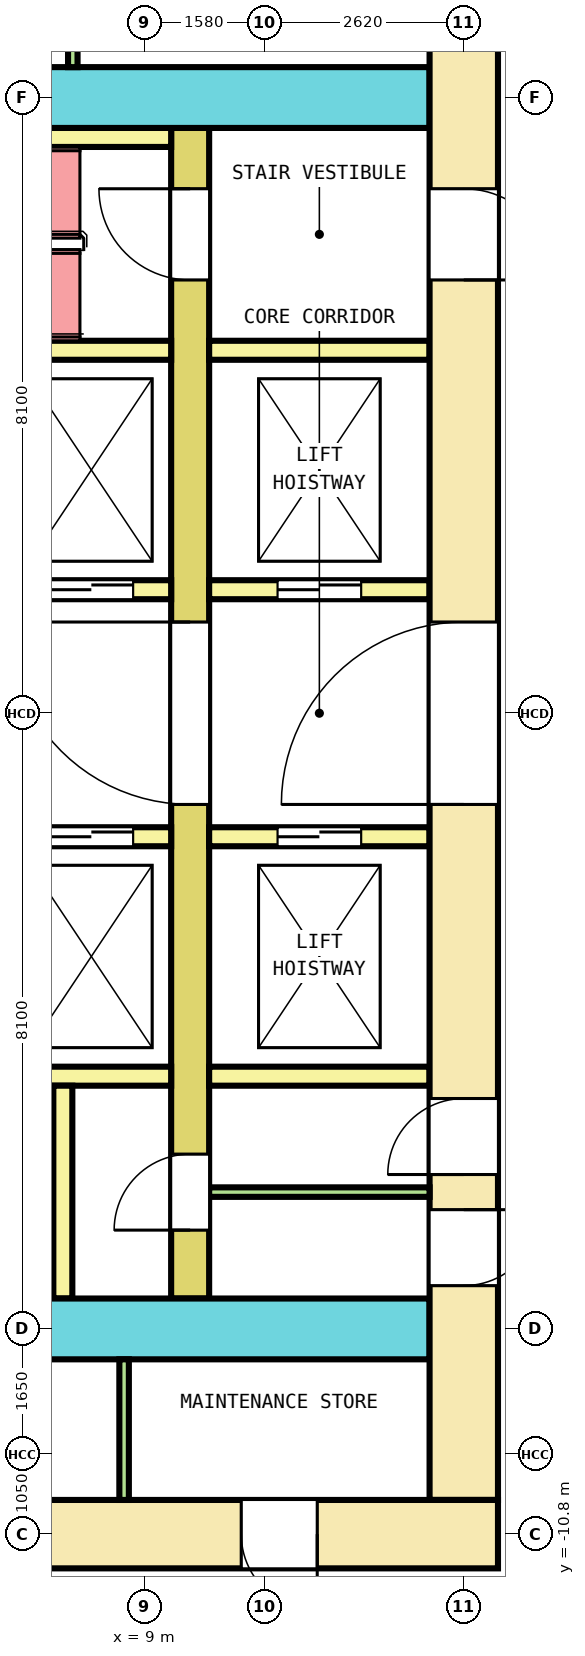
"""IFC4 building model, lengths in metres.
Left out: names, types, materials, properties, quantities, classifications, styles, units other than length and angle.
Written with IfcOpenShell. Run it as: python <this file> out.ifc"""

import sys

from ifc_helpers import new_model, si_unit, direction, frame, frame_2d, origin, place, context, subcontext, project, spatial, rectangle, extrude, element, fill, save


model = new_model("IFC4")
c1 = context("Model", 3, precision=1e-05, world=origin(), true_north=direction((0.0, 1.0)))
c2 = subcontext(c1, "Body", "Model", "MODEL_VIEW")
j1 = project(units=[si_unit("LENGTHUNIT", "METRE"), si_unit("PLANEANGLEUNIT", "RADIAN")], contexts=[c1])
p1 = place(None, origin())
s1 = spatial("IfcSite", under=j1, at=p1, CompositionType="ELEMENT")
p2 = place(p1, origin())
s2 = spatial("IfcBuilding", under=s1, at=p2, CompositionType="ELEMENT")
p3 = place(p2, frame((0.0, 0.0, 27.8)))
s3 = spatial("IfcBuildingStorey", under=s2, at=p3, CompositionType="ELEMENT", Elevation=27.8)
p4 = place(p3, frame((-13.65, -10.8, 0.0), z_axis=(0.0, 0.0, 1.0), x_axis=(1.0, 0.0, 0.0)))
e1 = element("IfcWall", 1, at=p4, inside=s3, PredefinedType="SHEAR", context=c2, shape_type="SweptSolid", body=[
    extrude(rectangle(XDim=27.3, YDim=0.9, at=frame_2d((13.65, 0.0))), origin(), (0.0, 0.0, 1.0), 4.1),
])
p5 = place(p4, frame((3.453, 0.0, 0.0)))
e2 = element("IfcOpeningElement", 2, at=p5, cuts=e1, PredefinedType="OPENING", context=c2, shape_type="SweptSolid", body=[
    extrude(rectangle(XDim=1.0, YDim=2.1, at=frame_2d((0.5, 1.05))), frame((0.0, 0.46, 0.0), z_axis=(0.0, -1.0, 0.0), x_axis=(1.0, 0.0, 0.0)), (0.0, 0.0, 1.0), 0.92),
])
p6 = place(p4, frame((9.653, 0.0, 0.0)))
e3 = element("IfcOpeningElement", 3, at=p6, cuts=e1, PredefinedType="OPENING", context=c2, shape_type="SweptSolid", body=[
    extrude(rectangle(XDim=1.0, YDim=2.1, at=frame_2d((0.5, 1.05))), frame((0.0, 0.46, 0.0), z_axis=(0.0, -1.0, 0.0), x_axis=(1.0, 0.0, 0.0)), (0.0, 0.0, 1.0), 0.92),
])
p7 = place(p4, frame((19.872, 0.0, 0.0)))
e4 = element("IfcOpeningElement", 4, at=p7, cuts=e1, PredefinedType="OPENING", context=c2, shape_type="SweptSolid", body=[
    extrude(rectangle(XDim=1.0, YDim=2.1, at=frame_2d((0.5, 1.05))), frame((0.0, 0.46, 0.0), z_axis=(0.0, -1.0, 0.0), x_axis=(1.0, 0.0, 0.0)), (0.0, 0.0, 1.0), 0.92),
])
p8 = place(p4, frame((23.922, 0.0, 0.0)))
e5 = element("IfcOpeningElement", 5, at=p8, cuts=e1, PredefinedType="OPENING", context=c2, shape_type="SweptSolid", body=[
    extrude(rectangle(XDim=1.0, YDim=2.1, at=frame_2d((0.5, 1.05))), frame((0.0, 0.46, 0.0), z_axis=(0.0, -1.0, 0.0), x_axis=(1.0, 0.0, 0.0)), (0.0, 0.0, 1.0), 0.92),
])
p9 = place(p4, frame((15.2, 0.0, 0.0)))
e6 = element("IfcOpeningElement", 6, at=p9, cuts=e1, PredefinedType="OPENING", context=c2, shape_type="SweptSolid", body=[
    extrude(rectangle(XDim=1.2, YDim=2.1, at=frame_2d((0.6, 1.05))), frame((0.0, 0.46, 0.0), z_axis=(0.0, -1.0, 0.0), x_axis=(1.0, 0.0, 0.0)), (0.0, 0.0, 1.0), 0.92),
])
p10 = place(p3, frame((13.2, -10.35, 0.0), z_axis=(0.0, 0.0, 1.0), x_axis=(0.0, 1.0, 0.0)))
e7 = element("IfcWall", 7, at=p10, inside=s3, PredefinedType="SHEAR", context=c2, shape_type="SweptSolid", body=[
    extrude(rectangle(XDim=20.7, YDim=0.9, at=frame_2d((10.35, 0.0))), origin(), (0.0, 0.0, 1.0), 4.1),
])
p11 = place(p10, frame((9.15, 0.0, 0.0)))
e8 = element("IfcOpeningElement", 8, at=p11, cuts=e7, PredefinedType="OPENING", context=c2, shape_type="SweptSolid", body=[
    extrude(rectangle(XDim=2.4, YDim=2.1, at=frame_2d((1.2, 1.05))), frame((0.0, 0.46, 0.0), z_axis=(0.0, -1.0, 0.0), x_axis=(1.0, 0.0, 0.0)), (0.0, 0.0, 1.0), 0.92),
])
p12 = place(p10, frame((16.05, 0.0, 0.0)))
e9 = element("IfcOpeningElement", 9, at=p12, cuts=e7, PredefinedType="OPENING", context=c2, shape_type="SweptSolid", body=[
    extrude(rectangle(XDim=1.2, YDim=2.1, at=frame_2d((0.6, 1.05))), frame((0.0, 0.46, 0.0), z_axis=(0.0, -1.0, 0.0), x_axis=(1.0, 0.0, 0.0)), (0.0, 0.0, 1.0), 0.92),
])
p13 = place(p10, frame((2.819, 0.0, 0.0)))
e10 = element("IfcOpeningElement", 10, at=p13, cuts=e7, PredefinedType="OPENING", context=c2, shape_type="SweptSolid", body=[
    extrude(rectangle(XDim=1.0, YDim=2.1, at=frame_2d((0.5, 1.05))), frame((0.0, 0.46, 0.0), z_axis=(0.0, -1.0, 0.0), x_axis=(1.0, 0.0, 0.0)), (0.0, 0.0, 1.0), 0.92),
])
p14 = place(p10, frame((4.281, 0.0, 0.0)))
e11 = element("IfcOpeningElement", 11, at=p14, cuts=e7, PredefinedType="OPENING", context=c2, shape_type="SweptSolid", body=[
    extrude(rectangle(XDim=1.0, YDim=2.1, at=frame_2d((0.5, 1.05))), frame((0.0, 0.46, 0.0), z_axis=(0.0, -1.0, 0.0), x_axis=(1.0, 0.0, 0.0)), (0.0, 0.0, 1.0), 0.92),
])
p15 = place(p3, frame((-12.75, 8.1, 0.0), z_axis=(0.0, 0.0, 1.0), x_axis=(1.0, 0.0, 0.0)))
e12 = element("IfcWall", 12, at=p15, inside=s3, PredefinedType="SHEAR", context=c2, shape_type="SweptSolid", body=[
    extrude(rectangle(XDim=25.5, YDim=0.8, at=frame_2d((12.75, 0.0))), origin(), (0.0, 0.0, 1.0), 4.1),
])
p16 = place(p15, frame((13.675, 0.0, 0.0)))
e13 = element("IfcOpeningElement", 13, at=p16, cuts=e12, PredefinedType="OPENING", context=c2, shape_type="SweptSolid", body=[
    extrude(rectangle(XDim=1.4, YDim=2.1, at=frame_2d((0.7, 1.05))), frame((0.0, 0.41, 0.0), z_axis=(0.0, -1.0, 0.0), x_axis=(1.0, 0.0, 0.0)), (0.0, 0.0, 1.0), 0.82),
])
p17 = place(p3, frame((-12.75, -8.1, 0.0), z_axis=(0.0, 0.0, 1.0), x_axis=(1.0, 0.0, 0.0)))
e14 = element("IfcWall", 14, at=p17, inside=s3, PredefinedType="SHEAR", context=c2, shape_type="SweptSolid", body=[
    extrude(rectangle(XDim=25.5, YDim=0.8, at=frame_2d((12.75, 0.0))), origin(), (0.0, 0.0, 1.0), 4.1),
])
p18 = place(p17, frame((14.3, 0.0, 0.0)))
e15 = element("IfcOpeningElement", 15, at=p18, cuts=e14, PredefinedType="OPENING", context=c2, shape_type="SweptSolid", body=[
    extrude(rectangle(XDim=1.2, YDim=2.1, at=frame_2d((0.6, 1.05))), frame((0.0, 0.41, 0.0), z_axis=(0.0, -1.0, 0.0), x_axis=(1.0, 0.0, 0.0)), (0.0, 0.0, 1.0), 0.82),
])
p19 = place(p3, frame((9.6, -7.7, 0.0), z_axis=(0.0, 0.0, 1.0), x_axis=(0.0, 1.0, 0.0)))
e16 = element("IfcWall", 16, at=p19, inside=s3, PredefinedType="SHEAR", context=c2, shape_type="SweptSolid", body=[
    extrude(rectangle(XDim=15.4, YDim=0.5, at=frame_2d((7.7, 0.0))), origin(), (0.0, 0.0, 1.0), 4.1),
])
p20 = place(p19, frame((6.5, 0.0, 0.0)))
e17 = element("IfcOpeningElement", 17, at=p20, cuts=e16, PredefinedType="OPENING", context=c2, shape_type="SweptSolid", body=[
    extrude(rectangle(XDim=2.4, YDim=2.1, at=frame_2d((1.2, 1.05))), frame((0.0, 0.26, 0.0), z_axis=(0.0, -1.0, 0.0), x_axis=(1.0, 0.0, 0.0)), (0.0, 0.0, 1.0), 0.52),
])
p21 = place(p19, frame((13.4, 0.0, 0.0)))
e18 = element("IfcOpeningElement", 18, at=p21, cuts=e16, PredefinedType="OPENING", context=c2, shape_type="SweptSolid", body=[
    extrude(rectangle(XDim=1.2, YDim=2.1, at=frame_2d((0.6, 1.05))), frame((0.0, 0.26, 0.0), z_axis=(0.0, -1.0, 0.0), x_axis=(1.0, 0.0, 0.0)), (0.0, 0.0, 1.0), 0.52),
])
p22 = place(p19, frame((0.9, 0.0, 0.0)))
e19 = element("IfcOpeningElement", 19, at=p22, cuts=e16, PredefinedType="OPENING", context=c2, shape_type="SweptSolid", body=[
    extrude(rectangle(XDim=1.0, YDim=2.1, at=frame_2d((0.5, 1.05))), frame((0.0, 0.26, 0.0), z_axis=(0.0, -1.0, 0.0), x_axis=(1.0, 0.0, 0.0)), (0.0, 0.0, 1.0), 0.52),
])
p23 = place(p3, frame((-9.35, 1.625, 0.0), z_axis=(0.0, 0.0, 1.0), x_axis=(1.0, 0.0, 0.0)))
e20 = element("IfcWall", 20, at=p23, inside=s3, PredefinedType="SOLIDWALL", context=c2, shape_type="SweptSolid", body=[
    extrude(rectangle(XDim=18.7, YDim=0.25, at=frame_2d((9.35, 0.0))), origin(), (0.0, 0.0, 1.0), 4.1),
])
p24 = place(p23, frame((0.5, 0.0, 0.0)))
e21 = element("IfcOpeningElement", 21, at=p24, cuts=e20, PredefinedType="OPENING", context=c2, shape_type="SweptSolid", body=[
    extrude(rectangle(XDim=1.1, YDim=2.1, at=frame_2d((0.55, 1.05))), frame((0.0, 0.135, 0.0), z_axis=(0.0, -1.0, 0.0), x_axis=(1.0, 0.0, 0.0)), (0.0, 0.0, 1.0), 0.27),
])
p25 = place(p23, frame((17.1, 0.0, 0.0)))
e22 = element("IfcOpeningElement", 22, at=p25, cuts=e20, PredefinedType="OPENING", context=c2, shape_type="SweptSolid", body=[
    extrude(rectangle(XDim=1.1, YDim=2.1, at=frame_2d((0.55, 1.05))), frame((0.0, 0.135, 0.0), z_axis=(0.0, -1.0, 0.0), x_axis=(1.0, 0.0, 0.0)), (0.0, 0.0, 1.0), 0.27),
])
p26 = place(p3, frame((9.85, 1.625, 0.0), z_axis=(0.0, 0.0, 1.0), x_axis=(1.0, 0.0, 0.0)))
e23 = element("IfcWall", 23, at=p26, inside=s3, PredefinedType="SOLIDWALL", context=c2, shape_type="SweptSolid", body=[
    extrude(rectangle(XDim=2.9, YDim=0.25, at=frame_2d((1.45, 0.0))), origin(), (0.0, 0.0, 1.0), 4.1),
])
p27 = place(p26, frame((0.9, 0.0, 0.0)))
e24 = element("IfcOpeningElement", 24, at=p27, cuts=e23, PredefinedType="OPENING", context=c2, shape_type="SweptSolid", body=[
    extrude(rectangle(XDim=1.1, YDim=2.1, at=frame_2d((0.55, 1.05))), frame((0.0, 0.135, 0.0), z_axis=(0.0, -1.0, 0.0), x_axis=(1.0, 0.0, 0.0)), (0.0, 0.0, 1.0), 0.27),
])
p28 = place(p3, frame((-9.35, 4.775, 0.0), z_axis=(0.0, 0.0, 1.0), x_axis=(1.0, 0.0, 0.0)))
e25 = element("IfcWall", 25, at=p28, inside=s3, PredefinedType="SOLIDWALL", context=c2, shape_type="SweptSolid", body=[
    extrude(rectangle(XDim=18.7, YDim=0.25, at=frame_2d((9.35, 0.0))), origin(), (0.0, 0.0, 1.0), 4.1),
])
p29 = place(p3, frame((9.85, 4.775, 0.0), z_axis=(0.0, 0.0, 1.0), x_axis=(1.0, 0.0, 0.0)))
e26 = element("IfcWall", 26, at=p29, inside=s3, PredefinedType="SOLIDWALL", context=c2, shape_type="SweptSolid", body=[
    extrude(rectangle(XDim=2.9, YDim=0.25, at=frame_2d((1.45, 0.0))), origin(), (0.0, 0.0, 1.0), 4.1),
])
p30 = place(p3, frame((-9.35, -1.625, 0.0), z_axis=(0.0, 0.0, 1.0), x_axis=(1.0, 0.0, 0.0)))
e27 = element("IfcWall", 27, at=p30, inside=s3, PredefinedType="SOLIDWALL", context=c2, shape_type="SweptSolid", body=[
    extrude(rectangle(XDim=18.7, YDim=0.25, at=frame_2d((9.35, 0.0))), origin(), (0.0, 0.0, 1.0), 4.1),
])
p31 = place(p30, frame((0.5, 0.0, 0.0)))
e28 = element("IfcOpeningElement", 28, at=p31, cuts=e27, PredefinedType="OPENING", context=c2, shape_type="SweptSolid", body=[
    extrude(rectangle(XDim=1.1, YDim=2.1, at=frame_2d((0.55, 1.05))), frame((0.0, 0.135, 0.0), z_axis=(0.0, -1.0, 0.0), x_axis=(1.0, 0.0, 0.0)), (0.0, 0.0, 1.0), 0.27),
])
p32 = place(p30, frame((17.1, 0.0, 0.0)))
e29 = element("IfcOpeningElement", 29, at=p32, cuts=e27, PredefinedType="OPENING", context=c2, shape_type="SweptSolid", body=[
    extrude(rectangle(XDim=1.1, YDim=2.1, at=frame_2d((0.55, 1.05))), frame((0.0, 0.135, 0.0), z_axis=(0.0, -1.0, 0.0), x_axis=(1.0, 0.0, 0.0)), (0.0, 0.0, 1.0), 0.27),
])
p33 = place(p3, frame((9.85, -1.625, 0.0), z_axis=(0.0, 0.0, 1.0), x_axis=(1.0, 0.0, 0.0)))
e30 = element("IfcWall", 30, at=p33, inside=s3, PredefinedType="SOLIDWALL", context=c2, shape_type="SweptSolid", body=[
    extrude(rectangle(XDim=2.9, YDim=0.25, at=frame_2d((1.45, 0.0))), origin(), (0.0, 0.0, 1.0), 4.1),
])
p34 = place(p33, frame((0.9, 0.0, 0.0)))
e31 = element("IfcOpeningElement", 31, at=p34, cuts=e30, PredefinedType="OPENING", context=c2, shape_type="SweptSolid", body=[
    extrude(rectangle(XDim=1.1, YDim=2.1, at=frame_2d((0.55, 1.05))), frame((0.0, 0.135, 0.0), z_axis=(0.0, -1.0, 0.0), x_axis=(1.0, 0.0, 0.0)), (0.0, 0.0, 1.0), 0.27),
])
p35 = place(p3, frame((-9.35, -4.775, 0.0), z_axis=(0.0, 0.0, 1.0), x_axis=(1.0, 0.0, 0.0)))
e32 = element("IfcWall", 32, at=p35, inside=s3, PredefinedType="SOLIDWALL", context=c2, shape_type="SweptSolid", body=[
    extrude(rectangle(XDim=18.7, YDim=0.25, at=frame_2d((9.35, 0.0))), origin(), (0.0, 0.0, 1.0), 4.1),
])
p36 = place(p3, frame((9.85, -4.775, 0.0), z_axis=(0.0, 0.0, 1.0), x_axis=(1.0, 0.0, 0.0)))
e33 = element("IfcWall", 33, at=p36, inside=s3, PredefinedType="SOLIDWALL", context=c2, shape_type="SweptSolid", body=[
    extrude(rectangle(XDim=2.9, YDim=0.25, at=frame_2d((1.45, 0.0))), origin(), (0.0, 0.0, 1.0), 4.1),
])
p37 = place(p3, frame((3.55, 7.575, 0.0), z_axis=(0.0, 0.0, 1.0), x_axis=(1.0, 0.0, 0.0)))
e34 = element("IfcWall", 34, at=p37, inside=s3, PredefinedType="SOLIDWALL", context=c2, shape_type="SweptSolid", body=[
    extrude(rectangle(XDim=5.8, YDim=0.25, at=frame_2d((2.9, 0.0))), origin(), (0.0, 0.0, 1.0), 4.1),
])
p38 = place(p3, frame((7.925, -7.7, 0.0), z_axis=(0.0, 0.0, 1.0), x_axis=(0.0, 1.0, 0.0)))
e35 = element("IfcWall", 35, at=p38, inside=s3, PredefinedType="SOLIDWALL", context=c2, shape_type="SweptSolid", body=[
    extrude(rectangle(XDim=2.8, YDim=0.25, at=frame_2d((1.4, 0.0))), origin(), (0.0, 0.0, 1.0), 4.1),
])
p39 = place(p3, frame((9.85, -6.3, 0.0), z_axis=(0.0, 0.0, 1.0), x_axis=(1.0, 0.0, 0.0)))
e36 = element("IfcWall", 36, at=p39, inside=s3, PredefinedType="PARTITIONING", context=c2, shape_type="SweptSolid", body=[
    extrude(rectangle(XDim=2.9, YDim=0.125, at=frame_2d((1.45, 0.0))), origin(), (0.0, 0.0, 1.0), 4.1),
])
for number, where, z_axis, x_axis in (
    (37, (8.056, 8.5, 0.0), (0.0, 0.0, 1.0), (0.0, 1.0, 0.0)),
    (38, (8.731, -10.35, 0.0), (0.0, 0.0, 1.0), (0.0, 1.0, 0.0)),
):
    element("IfcWall", number, at=place(p3, frame(where, z_axis=z_axis, x_axis=x_axis)), inside=s3, PredefinedType="PARTITIONING", context=c2, shape_type="SweptSolid", body=[
        extrude(rectangle(XDim=1.85, YDim=0.125, at=frame_2d((0.925, 0.0))), origin(), (0.0, 0.0, 1.0), 4.1),
    ])
p40 = place(p25, origin())
e39 = element("IfcDoor", 39, at=p40, inside=s3, OperationType="DOUBLE_DOOR_SLIDING", PredefinedType="DOOR", context=c2, shape_type="SweptSolid", body=[
    extrude(rectangle(XDim=1.1, YDim=2.1, at=frame_2d((0.55, 1.05))), frame((0.0, 0.075, 0.0), z_axis=(0.0, -1.0, 0.0), x_axis=(1.0, 0.0, 0.0)), (0.0, 0.0, 1.0), 0.15),
])
fill(e22, e39)
p41 = place(p27, origin())
e40 = element("IfcDoor", 40, at=p41, inside=s3, OperationType="DOUBLE_DOOR_SLIDING", PredefinedType="DOOR", context=c2, shape_type="SweptSolid", body=[
    extrude(rectangle(XDim=1.1, YDim=2.1, at=frame_2d((0.55, 1.05))), frame((0.0, 0.075, 0.0), z_axis=(0.0, -1.0, 0.0), x_axis=(1.0, 0.0, 0.0)), (0.0, 0.0, 1.0), 0.15),
])
fill(e24, e40)
p42 = place(p32, origin())
e41 = element("IfcDoor", 41, at=p42, inside=s3, OperationType="DOUBLE_DOOR_SLIDING", PredefinedType="DOOR", context=c2, shape_type="SweptSolid", body=[
    extrude(rectangle(XDim=1.1, YDim=2.1, at=frame_2d((0.55, 1.05))), frame((0.0, 0.075, 0.0), z_axis=(0.0, -1.0, 0.0), x_axis=(1.0, 0.0, 0.0)), (0.0, 0.0, 1.0), 0.15),
])
fill(e29, e41)
p43 = place(p34, origin())
e42 = element("IfcDoor", 42, at=p43, inside=s3, OperationType="DOUBLE_DOOR_SLIDING", PredefinedType="DOOR", context=c2, shape_type="SweptSolid", body=[
    extrude(rectangle(XDim=1.1, YDim=2.1, at=frame_2d((0.55, 1.05))), frame((0.0, 0.075, 0.0), z_axis=(0.0, -1.0, 0.0), x_axis=(1.0, 0.0, 0.0)), (0.0, 0.0, 1.0), 0.15),
])
fill(e31, e42)
p44 = place(p20, origin())
e43 = element("IfcDoor", 43, at=p44, inside=s3, OperationType="DOUBLE_DOOR_SINGLE_SWING", PredefinedType="DOOR", context=c2, shape_type="SweptSolid", body=[
    extrude(rectangle(XDim=2.4, YDim=2.1, at=frame_2d((1.2, 1.05))), frame((0.0, 0.2, 0.0), z_axis=(0.0, -1.0, 0.0), x_axis=(1.0, 0.0, 0.0)), (0.0, 0.0, 1.0), 0.4),
])
fill(e17, e43)
p45 = place(p11, origin())
e44 = element("IfcDoor", 44, at=p45, inside=s3, OperationType="DOUBLE_DOOR_SINGLE_SWING", PredefinedType="DOOR", context=c2, shape_type="SweptSolid", body=[
    extrude(rectangle(XDim=2.4, YDim=2.1, at=frame_2d((1.2, 1.05))), frame((0.0, 0.3, 0.0), z_axis=(0.0, -1.0, 0.0), x_axis=(1.0, 0.0, 0.0)), (0.0, 0.0, 1.0), 0.6),
])
fill(e8, e44)
p46 = place(p21, origin())
e45 = element("IfcDoor", 45, at=p46, inside=s3, OperationType="SINGLE_SWING_RIGHT", PredefinedType="DOOR", context=c2, shape_type="SweptSolid", body=[
    extrude(rectangle(XDim=1.2, YDim=2.1, at=frame_2d((0.6, 1.05))), frame((0.0, 0.2, 0.0), z_axis=(0.0, -1.0, 0.0), x_axis=(1.0, 0.0, 0.0)), (0.0, 0.0, 1.0), 0.4),
])
fill(e18, e45)
p47 = place(p12, origin())
e46 = element("IfcDoor", 46, at=p47, inside=s3, OperationType="SINGLE_SWING_LEFT", PredefinedType="DOOR", context=c2, shape_type="SweptSolid", body=[
    extrude(rectangle(XDim=1.2, YDim=2.1, at=frame_2d((0.6, 1.05))), frame((0.0, 0.3, 0.0), z_axis=(0.0, -1.0, 0.0), x_axis=(1.0, 0.0, 0.0)), (0.0, 0.0, 1.0), 0.6),
])
fill(e9, e46)
p48 = place(p22, origin())
e47 = element("IfcDoor", 47, at=p48, inside=s3, OperationType="SINGLE_SWING_RIGHT", PredefinedType="DOOR", context=c2, shape_type="SweptSolid", body=[
    extrude(rectangle(XDim=1.0, YDim=2.1, at=frame_2d((0.5, 1.05))), frame((0.0, 0.2, 0.0), z_axis=(0.0, -1.0, 0.0), x_axis=(1.0, 0.0, 0.0)), (0.0, 0.0, 1.0), 0.4),
])
fill(e19, e47)
p49 = place(p13, origin())
e48 = element("IfcDoor", 48, at=p49, inside=s3, OperationType="SINGLE_SWING_LEFT", PredefinedType="DOOR", context=c2, shape_type="SweptSolid", body=[
    extrude(rectangle(XDim=1.0, YDim=2.1, at=frame_2d((0.5, 1.05))), frame((0.0, 0.3, 0.0), z_axis=(0.0, -1.0, 0.0), x_axis=(1.0, 0.0, 0.0)), (0.0, 0.0, 1.0), 0.6),
])
fill(e10, e48)
p50 = place(p14, origin())
e49 = element("IfcDoor", 49, at=p50, inside=s3, OperationType="SINGLE_SWING_RIGHT", PredefinedType="DOOR", context=c2, shape_type="SweptSolid", body=[
    extrude(rectangle(XDim=1.0, YDim=2.1, at=frame_2d((0.5, 1.05))), frame((0.0, 0.3, 0.0), z_axis=(0.0, -1.0, 0.0), x_axis=(1.0, 0.0, 0.0)), (0.0, 0.0, 1.0), 0.6),
])
fill(e11, e49)
p51 = place(p8, origin())
e50 = element("IfcDoor", 50, at=p51, inside=s3, OperationType="SINGLE_SWING_RIGHT", PredefinedType="DOOR", context=c2, shape_type="SweptSolid", body=[
    extrude(rectangle(XDim=1.0, YDim=2.1, at=frame_2d((0.5, 1.05))), frame((0.0, 0.3, 0.0), z_axis=(0.0, -1.0, 0.0), x_axis=(1.0, 0.0, 0.0)), (0.0, 0.0, 1.0), 0.6),
])
fill(e5, e50)
save(model, sys.argv[1])
